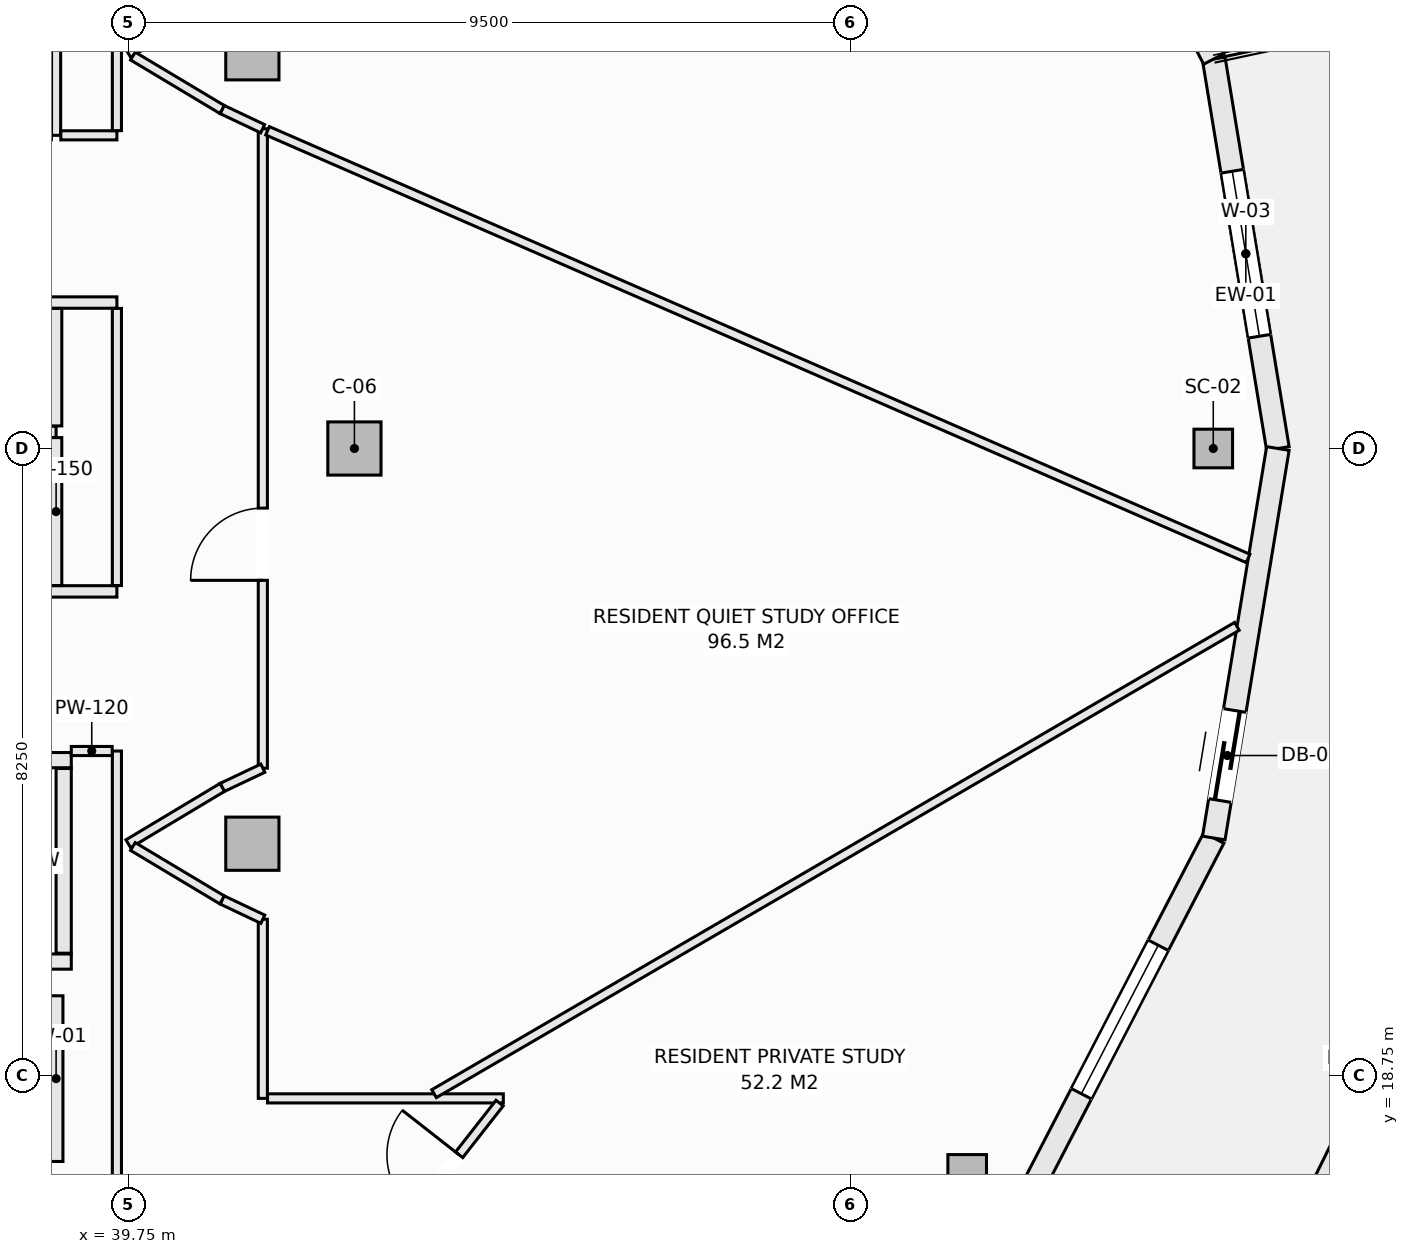
"""IFC4 building model, lengths in metres.
Left out: names, types, materials, properties, quantities, classifications, styles, units other than length and angle.
Written with IfcOpenShell. Run it as: python <this file> out.ifc"""

import sys

from ifc_helpers import new_model, si_unit, direction, frame, frame_2d, origin, origin_2d, place, context, subcontext, project, spatial, rectangle, hollow_rectangle, extrude, element, fill, save


model = new_model("IFC4")
c1 = context("Model", 3, precision=1e-05, world=origin(), true_north=direction((0.0, 1.0)))
c2 = subcontext(c1, "Body", "Model", "MODEL_VIEW")
j1 = project(units=[si_unit("LENGTHUNIT", "METRE"), si_unit("PLANEANGLEUNIT", "RADIAN")], contexts=[c1])
p1 = place(None, origin())
s1 = spatial("IfcSite", under=j1, at=p1, CompositionType="ELEMENT")
p2 = place(p1, origin())
s2 = spatial("IfcBuilding", under=s1, at=p2, CompositionType="ELEMENT")
p3 = place(p2, frame((0.0, 0.0, 229.4)))
s3 = spatial("IfcBuildingStorey", under=s2, at=p3, CompositionType="ELEMENT", Elevation=229.4)
for number, where, z_axis, x_axis in (
    (1, (54.025, 27.0, -0.27), (0.0, 0.0, 1.0), (1.0, 0.0, 0.0)),
    (2, (50.787, 17.456, -0.27), (0.0, 0.0, 1.0), (1.0, 0.0, 0.0)),
):
    element("IfcColumn", number, at=place(p3, frame(where, z_axis=z_axis, x_axis=x_axis)), inside=s3, PredefinedType="COLUMN", context=c2, shape_type="SweptSolid", body=[
        extrude(hollow_rectangle(XDim=0.508, YDim=0.508, WallThickness=0.019, at=origin_2d()), origin(), (0.0, 0.0, 1.0), 3.3),
    ])
for number, where, z_axis, x_axis in (
    (3, (42.725, 27.0, -0.27), (0.0, 0.0, 1.0), (1.0, 0.0, 0.0)),
    (4, (41.382, 32.199, -0.27), (0.0, 0.0, 1.0), (1.0, 0.0, 0.0)),
    (5, (41.382, 21.801, -0.27), (0.0, 0.0, 1.0), (1.0, 0.0, 0.0)),
):
    element("IfcColumn", number, at=place(p3, frame(where, z_axis=z_axis, x_axis=x_axis)), inside=s3, PredefinedType="COLUMN", context=c2, shape_type="SweptSolid", body=[
        extrude(rectangle(XDim=0.7, YDim=0.7, at=origin_2d()), origin(), (0.0, 0.0, 1.0), 3.3),
    ])
p4 = place(p3, frame((54.032, 32.125, 0.0), z_axis=(0.0, 0.0, 1.0), x_axis=(0.16237087798, -0.986729799886, 0.0)))
e6 = element("IfcWall", 6, at=p4, inside=s3, PredefinedType="SOLIDWALL", context=c2, shape_type="SweptSolid", body=[
    extrude(rectangle(XDim=5.193, YDim=0.3, at=frame_2d((2.597, 0.0))), origin(), (0.0, 0.0, 1.0), 2.605),
])
p5 = place(p4, frame((1.497, 0.0, 0.72)))
e7 = element("IfcOpeningElement", 7, at=p5, cuts=e6, PredefinedType="OPENING", context=c2, shape_type="SweptSolid", body=[
    extrude(rectangle(XDim=2.2, YDim=1.65, at=frame_2d((1.1, 0.825))), frame((0.0, 0.16, 0.0), z_axis=(0.0, -1.0, 0.0), x_axis=(1.0, 0.0, 0.0)), (0.0, 0.0, 1.0), 0.32),
])
p6 = place(p3, frame((51.559, 36.9, 0.0), z_axis=(0.0, 0.0, 1.0), x_axis=(0.459808219482, -0.888018243786, 0.0)))
e8 = element("IfcWall", 8, at=p6, inside=s3, PredefinedType="SOLIDWALL", context=c2, shape_type="SweptSolid", body=[
    extrude(rectangle(XDim=5.378, YDim=0.3, at=frame_2d((2.689, 0.0))), origin(), (0.0, 0.0, 1.0), 2.605),
])
p7 = place(p6, frame((1.589, 0.0, 0.72)))
e9 = element("IfcOpeningElement", 9, at=p7, cuts=e8, PredefinedType="OPENING", context=c2, shape_type="SweptSolid", body=[
    extrude(rectangle(XDim=2.2, YDim=1.65, at=frame_2d((1.1, 0.825))), frame((0.0, 0.16, 0.0), z_axis=(0.0, -1.0, 0.0), x_axis=(1.0, 0.0, 0.0)), (0.0, 0.0, 1.0), 0.32),
])
p8 = place(p3, frame((51.559, 17.1, 0.0), z_axis=(0.0, 0.0, 1.0), x_axis=(0.459808219482, 0.888018243786, 0.0)))
e10 = element("IfcWall", 10, at=p8, inside=s3, PredefinedType="SOLIDWALL", context=c2, shape_type="SweptSolid", body=[
    extrude(rectangle(XDim=5.378, YDim=0.3, at=frame_2d((2.689, 0.0))), origin(), (0.0, 0.0, 1.0), 2.605),
])
p9 = place(p8, frame((1.589, 0.0, 0.72)))
e11 = element("IfcOpeningElement", 11, at=p9, cuts=e10, PredefinedType="OPENING", context=c2, shape_type="SweptSolid", body=[
    extrude(rectangle(XDim=2.2, YDim=1.65, at=frame_2d((1.1, 0.825))), frame((0.0, 0.16, 0.0), z_axis=(0.0, -1.0, 0.0), x_axis=(1.0, 0.0, 0.0)), (0.0, 0.0, 1.0), 0.32),
])
p10 = place(p3, frame((54.032, 21.875, 0.0), z_axis=(0.0, 0.0, 1.0), x_axis=(0.16237087798, 0.986729799886, 0.0)))
e12 = element("IfcWall", 12, at=p10, inside=s3, PredefinedType="SOLIDWALL", context=c2, shape_type="SweptSolid", body=[
    extrude(rectangle(XDim=5.193, YDim=0.3, at=frame_2d((2.597, 0.0))), origin(), (0.0, 0.0, 1.0), 2.605),
])
p11 = place(p10, frame((0.5, 0.0, 0.0)))
e13 = element("IfcOpeningElement", 13, at=p11, cuts=e12, PredefinedType="OPENING", context=c2, shape_type="SweptSolid", body=[
    extrude(rectangle(XDim=1.2, YDim=2.2, at=frame_2d((0.6, 1.1))), frame((0.0, 0.16, 0.0), z_axis=(0.0, -1.0, 0.0), x_axis=(1.0, 0.0, 0.0)), (0.0, 0.0, 1.0), 0.32),
])
p12 = place(p3, frame((54.616, 15.653, 0.0), z_axis=(0.0, 0.0, 1.0), x_axis=(0.441640961804, 0.897191875162, 0.0)))
e14 = element("IfcWall", 14, at=p12, inside=s3, PredefinedType="PARAPET", context=c2, shape_type="SweptSolid", body=[
    extrude(rectangle(XDim=6.178, YDim=0.22, at=frame_2d((3.089, 0.0))), origin(), (0.0, 0.0, 1.0), 0.52),
])
p13 = place(p3, frame((36.75, 22.9, 0.0), z_axis=(0.0, 0.0, 1.0), x_axis=(1.0, 0.0, 0.0)))
e15 = element("IfcWall", 15, at=p13, inside=s3, PredefinedType="SOLIDWALL", context=c2, shape_type="SweptSolid", body=[
    extrude(rectangle(XDim=2.25, YDim=0.2, at=frame_2d((1.125, 0.0))), origin(), (0.0, 0.0, 1.0), 3.03),
])
p14 = place(p13, frame((0.575, 0.0, 0.0)))
e16 = element("IfcOpeningElement", 16, at=p14, cuts=e15, PredefinedType="OPENING", context=c2, shape_type="SweptSolid", body=[
    extrude(rectangle(XDim=1.1, YDim=2.2, at=frame_2d((0.55, 1.1))), frame((0.0, 0.11, 0.0), z_axis=(0.0, -1.0, 0.0), x_axis=(1.0, 0.0, 0.0)), (0.0, 0.0, 1.0), 0.22),
])
p15 = place(p3, frame((36.75, 20.25, 0.0), z_axis=(0.0, 0.0, 1.0), x_axis=(1.0, 0.0, 0.0)))
e17 = element("IfcWall", 17, at=p15, inside=s3, PredefinedType="SOLIDWALL", context=c2, shape_type="SweptSolid", body=[
    extrude(rectangle(XDim=2.25, YDim=0.2, at=frame_2d((1.125, 0.0))), origin(), (0.0, 0.0, 1.0), 3.03),
])
p16 = place(p3, frame((38.9, 20.36, 0.0), z_axis=(0.0, 0.0, 1.0), x_axis=(0.0, 1.0, 0.0)))
e18 = element("IfcWall", 18, at=p16, inside=s3, PredefinedType="SOLIDWALL", context=c2, shape_type="SweptSolid", body=[
    extrude(rectangle(XDim=2.43, YDim=0.2, at=frame_2d((1.215, 0.0))), origin(), (0.0, 0.0, 1.0), 3.03),
])
p17 = place(p3, frame((30.077, 28.92, 0.0), z_axis=(0.0, 0.0, 1.0), x_axis=(1.0, 0.0, 0.0)))
e19 = element("IfcWall", 19, at=p17, inside=s3, PredefinedType="PARTITIONING", context=c2, shape_type="SweptSolid", body=[
    extrude(rectangle(XDim=9.523, YDim=0.15, at=frame_2d((4.762, 0.0))), origin(), (0.0, 0.0, 1.0), 3.03),
])
p18 = place(p17, frame((1.342, 0.0, 0.0)))
e20 = element("IfcOpeningElement", 20, at=p18, cuts=e19, PredefinedType="OPENING", context=c2, shape_type="SweptSolid", body=[
    extrude(rectangle(XDim=0.95, YDim=2.1, at=frame_2d((0.475, 1.05))), frame((0.0, 0.085, 0.0), z_axis=(0.0, -1.0, 0.0), x_axis=(1.0, 0.0, 0.0)), (0.0, 0.0, 1.0), 0.17),
])
p19 = place(p17, frame((5.498, 0.0, 0.0)))
e21 = element("IfcOpeningElement", 21, at=p19, cuts=e19, PredefinedType="OPENING", context=c2, shape_type="SweptSolid", body=[
    extrude(rectangle(XDim=0.95, YDim=2.1, at=frame_2d((0.475, 1.05))), frame((0.0, 0.085, 0.0), z_axis=(0.0, -1.0, 0.0), x_axis=(1.0, 0.0, 0.0)), (0.0, 0.0, 1.0), 0.17),
])
p20 = place(p3, frame((33.377, 25.12, 0.0), z_axis=(0.0, 0.0, 1.0), x_axis=(1.0, 0.0, 0.0)))
e22 = element("IfcWall", 22, at=p20, inside=s3, PredefinedType="PARTITIONING", context=c2, shape_type="SweptSolid", body=[
    extrude(rectangle(XDim=6.223, YDim=0.15, at=frame_2d((3.112, 0.0))), origin(), (0.0, 0.0, 1.0), 3.03),
])
p21 = place(p20, frame((2.441, 0.0, 0.0)))
e23 = element("IfcOpeningElement", 23, at=p21, cuts=e22, PredefinedType="OPENING", context=c2, shape_type="SweptSolid", body=[
    extrude(rectangle(XDim=0.95, YDim=2.1, at=frame_2d((0.475, 1.05))), frame((0.0, 0.085, 0.0), z_axis=(0.0, -1.0, 0.0), x_axis=(1.0, 0.0, 0.0)), (0.0, 0.0, 1.0), 0.17),
])
p22 = place(p3, frame((33.377, 27.22, 0.0), z_axis=(0.0, 0.0, 1.0), x_axis=(1.0, 0.0, 0.0)))
e24 = element("IfcWall", 24, at=p22, inside=s3, PredefinedType="PARTITIONING", context=c2, shape_type="SweptSolid", body=[
    extrude(rectangle(XDim=5.423, YDim=0.15, at=frame_2d((2.711, 0.0))), origin(), (0.0, 0.0, 1.0), 3.03),
])
p23 = place(p3, frame((38.8, 17.62, 0.0), z_axis=(0.0, 0.0, 1.0), x_axis=(0.0, 1.0, 0.0)))
e25 = element("IfcWall", 25, at=p23, inside=s3, PredefinedType="SOLIDWALL", context=c2, shape_type="SweptSolid", body=[
    extrude(rectangle(XDim=2.18, YDim=0.18, at=frame_2d((1.09, 0.0))), origin(), (0.0, 0.0, 1.0), 3.03),
])
p24 = place(p3, frame((38.8, 25.197, 0.0), z_axis=(0.0, 0.0, 1.0), x_axis=(0.0, 1.0, 0.0)))
e26 = element("IfcWall", 26, at=p24, inside=s3, PredefinedType="PARTITIONING", context=c2, shape_type="SweptSolid", body=[
    extrude(rectangle(XDim=1.946, YDim=0.15, at=frame_2d((0.973, 0.0))), origin(), (0.0, 0.0, 1.0), 3.03),
])
p25 = place(p3, frame((38.8, 27.297, 0.0), z_axis=(0.0, 0.0, 1.0), x_axis=(0.0, 1.0, 0.0)))
e27 = element("IfcWall", 27, at=p25, inside=s3, PredefinedType="PARTITIONING", context=c2, shape_type="SweptSolid", body=[
    extrude(rectangle(XDim=1.546, YDim=0.15, at=frame_2d((0.773, 0.0))), origin(), (0.0, 0.0, 1.0), 3.03),
])
p26 = place(p3, frame((38.8, 31.12, 0.0), z_axis=(0.0, 0.0, 1.0), x_axis=(0.0, 1.0, 0.0)))
e28 = element("IfcWall", 28, at=p26, inside=s3, PredefinedType="PARTITIONING", context=c2, shape_type="SweptSolid", body=[
    extrude(rectangle(XDim=2.63, YDim=0.12, at=frame_2d((1.315, 0.0))), origin(), (0.0, 0.0, 1.0), 3.03),
])
p27 = place(p3, frame((38.862, 31.12, 0.0), z_axis=(0.0, 0.0, 1.0), x_axis=(1.0, 0.0, 0.0)))
e29 = element("IfcWall", 29, at=p27, inside=s3, PredefinedType="PARTITIONING", context=c2, shape_type="SweptSolid", body=[
    extrude(rectangle(XDim=0.738, YDim=0.12, at=frame_2d((0.369, 0.0))), origin(), (0.0, 0.0, 1.0), 3.03),
])
p28 = place(p3, frame((39.6, 16.5, 0.0), z_axis=(0.0, 0.0, 1.0), x_axis=(0.0, 1.0, 0.0)))
e30 = element("IfcWall", 30, at=p28, inside=s3, PredefinedType="PARTITIONING", context=c2, shape_type="SweptSolid", body=[
    extrude(rectangle(XDim=6.52, YDim=0.12, at=frame_2d((3.26, 0.0))), origin(), (0.0, 0.0, 1.0), 2.478),
])
p29 = place(p3, frame((39.6, 25.197, 0.0), z_axis=(0.0, 0.0, 1.0), x_axis=(0.0, 1.0, 0.0)))
e31 = element("IfcWall", 31, at=p29, inside=s3, PredefinedType="PARTITIONING", context=c2, shape_type="SweptSolid", body=[
    extrude(rectangle(XDim=3.646, YDim=0.12, at=frame_2d((1.823, 0.0))), origin(), (0.0, 0.0, 1.0), 3.03),
])
p30 = place(p3, frame((39.6, 31.182, 0.0), z_axis=(0.0, 0.0, 1.0), x_axis=(0.0, 1.0, 0.0)))
e32 = element("IfcWall", 32, at=p30, inside=s3, PredefinedType="PARTITIONING", context=c2, shape_type="SweptSolid", body=[
    extrude(rectangle(XDim=6.318, YDim=0.12, at=frame_2d((3.159, 0.0))), origin(), (0.0, 0.0, 1.0), 3.03),
])
p31 = place(p3, frame((41.52, 18.45, 0.0), z_axis=(0.0, 0.0, 1.0), x_axis=(0.0, 1.0, 0.0)))
e33 = element("IfcWall", 33, at=p31, inside=s3, PredefinedType="PARTITIONING", context=c2, shape_type="SweptSolid", body=[
    extrude(rectangle(XDim=2.357, YDim=0.12, at=frame_2d((1.178, 0.0))), origin(), (0.0, 0.0, 1.0), 3.03),
])
p32 = place(p3, frame((41.52, 22.794, 0.0), z_axis=(0.0, 0.0, 1.0), x_axis=(0.0, 1.0, 0.0)))
e34 = element("IfcWall", 34, at=p32, inside=s3, PredefinedType="PARTITIONING", context=c2, shape_type="SweptSolid", body=[
    extrude(rectangle(XDim=8.413, YDim=0.12, at=frame_2d((4.207, 0.0))), origin(), (0.0, 0.0, 1.0), 2.478),
])
p33 = place(p32, frame((2.471, 0.0, 0.0)))
e35 = element("IfcOpeningElement", 35, at=p33, cuts=e34, PredefinedType="OPENING", context=c2, shape_type="SweptSolid", body=[
    extrude(rectangle(XDim=0.95, YDim=2.1, at=frame_2d((0.475, 1.05))), frame((0.0, 0.07, 0.0), z_axis=(0.0, -1.0, 0.0), x_axis=(1.0, 0.0, 0.0)), (0.0, 0.0, 1.0), 0.14),
])
p34 = place(p3, frame((39.75, 32.199, 0.0), z_axis=(0.0, 0.0, 1.0), x_axis=(0.857702120906, 0.514146935996, 0.0)))
e36 = element("IfcWall", 36, at=p34, inside=s3, PredefinedType="PARTITIONING", context=c2, shape_type="SweptSolid", body=[
    extrude(rectangle(XDim=1.441, YDim=0.12, at=frame_2d((0.721, 0.0))), origin(), (0.0, 0.0, 1.0), 3.03),
])
p35 = place(p3, frame((39.81, 32.163, 0.0), z_axis=(0.0, 0.0, 1.0), x_axis=(0.858011245414, -0.513630901273, 0.0)))
e37 = element("IfcWall", 37, at=p35, inside=s3, PredefinedType="PARTITIONING", context=c2, shape_type="SweptSolid", body=[
    extrude(rectangle(XDim=1.37, YDim=0.12, at=frame_2d((0.685, 0.0))), origin(), (0.0, 0.0, 1.0), 3.03),
])
p36 = place(p3, frame((40.986, 31.459, 0.0), z_axis=(0.0, 0.0, 1.0), x_axis=(0.903687141457, -0.428193356283, 0.0)))
e38 = element("IfcWall", 38, at=p36, inside=s3, PredefinedType="PARTITIONING", context=c2, shape_type="SweptSolid", body=[
    extrude(rectangle(XDim=0.588, YDim=0.12, at=frame_2d((0.294, 0.0))), origin(), (0.0, 0.0, 1.0), 3.03),
])
p37 = place(p3, frame((40.986, 22.541, 0.0), z_axis=(0.0, 0.0, 1.0), x_axis=(0.903729424576, 0.428104107847, 0.0)))
e39 = element("IfcWall", 39, at=p37, inside=s3, PredefinedType="PARTITIONING", context=c2, shape_type="SweptSolid", body=[
    extrude(rectangle(XDim=0.591, YDim=0.12, at=frame_2d((0.295, 0.0))), origin(), (0.0, 0.0, 1.0), 3.03),
])
p38 = place(p3, frame((39.75, 21.8, 0.0), z_axis=(0.0, 0.0, 1.0), x_axis=(0.857702120906, 0.514146935996, 0.0)))
e40 = element("IfcWall", 40, at=p38, inside=s3, PredefinedType="PARTITIONING", context=c2, shape_type="SweptSolid", body=[
    extrude(rectangle(XDim=1.441, YDim=0.12, at=frame_2d((0.721, 0.0))), origin(), (0.0, 0.0, 1.0), 3.03),
])
p39 = place(p3, frame((39.81, 21.764, 0.0), z_axis=(0.0, 0.0, 1.0), x_axis=(0.858011245414, -0.513630901273, 0.0)))
e41 = element("IfcWall", 41, at=p39, inside=s3, PredefinedType="PARTITIONING", context=c2, shape_type="SweptSolid", body=[
    extrude(rectangle(XDim=1.37, YDim=0.12, at=frame_2d((0.685, 0.0))), origin(), (0.0, 0.0, 1.0), 3.03),
])
p40 = place(p3, frame((40.986, 21.06, 0.0), z_axis=(0.0, 0.0, 1.0), x_axis=(0.90356951601, -0.428441512621, 0.0)))
e42 = element("IfcWall", 42, at=p40, inside=s3, PredefinedType="PARTITIONING", context=c2, shape_type="SweptSolid", body=[
    extrude(rectangle(XDim=0.591, YDim=0.12, at=frame_2d((0.295, 0.0))), origin(), (0.0, 0.0, 1.0), 3.03),
])
p41 = place(p3, frame((41.582, 18.45, 0.0), z_axis=(0.0, 0.0, 1.0), x_axis=(1.0, 0.0, 0.0)))
e43 = element("IfcWall", 43, at=p41, inside=s3, PredefinedType="PARTITIONING", context=c2, shape_type="SweptSolid", body=[
    extrude(rectangle(XDim=3.102, YDim=0.12, at=frame_2d((1.551, 0.0))), origin(), (0.0, 0.0, 1.0), 3.03),
])
p42 = place(p3, frame((43.157, 16.5, 0.0), z_axis=(0.0, 0.0, 1.0), x_axis=(0.616566276607, 0.787303008092, 0.0)))
e44 = element("IfcWall", 44, at=p42, inside=s3, PredefinedType="PARTITIONING", context=c2, shape_type="SweptSolid", body=[
    extrude(rectangle(XDim=2.398, YDim=0.12, at=frame_2d((1.199, 0.0))), origin(), (0.0, 0.0, 1.0), 3.03),
])
p43 = place(p42, frame((0.584, 0.0, 0.0)))
e45 = element("IfcOpeningElement", 45, at=p43, cuts=e44, PredefinedType="OPENING", context=c2, shape_type="SweptSolid", body=[
    extrude(rectangle(XDim=0.95, YDim=2.1, at=frame_2d((0.475, 1.05))), frame((0.0, 0.07, 0.0), z_axis=(0.0, -1.0, 0.0), x_axis=(1.0, 0.0, 0.0)), (0.0, 0.0, 1.0), 0.14),
])
p44 = place(p3, frame((39.0, 23.02, 0.0), z_axis=(0.0, 0.0, 1.0), x_axis=(1.0, 0.0, 0.0)))
e46 = element("IfcWall", 46, at=p44, inside=s3, PredefinedType="PARTITIONING", context=c2, shape_type="SweptSolid", body=[
    extrude(rectangle(XDim=0.538, YDim=0.12, at=frame_2d((0.269, 0.0))), origin(), (0.0, 0.0, 1.0), 3.03),
])
p45 = place(p3, frame((43.773, 18.512, 0.0), z_axis=(0.0, 0.0, 1.0), x_axis=(0.864261022419, 0.503043621495, 0.0)))
e47 = element("IfcWall", 47, at=p45, inside=s3, PredefinedType="PARTITIONING", context=c2, shape_type="SweptSolid", body=[
    extrude(rectangle(XDim=12.222, YDim=0.12, at=frame_2d((6.111, 0.0))), origin(), (0.0, 0.0, 1.0), 3.03),
])
p46 = place(p3, frame((41.582, 31.18, 0.0), z_axis=(0.0, 0.0, 1.0), x_axis=(0.916624100851, -0.399750244202, 0.0)))
e48 = element("IfcWall", 48, at=p46, inside=s3, PredefinedType="PARTITIONING", context=c2, shape_type="SweptSolid", body=[
    extrude(rectangle(XDim=14.074, YDim=0.12, at=frame_2d((7.037, 0.0))), origin(), (0.0, 0.0, 1.0), 2.478),
])
p47 = place(p5, origin())
e49 = element("IfcWindow", 49, at=p47, inside=s3, PartitioningType="SINGLE_PANEL", PredefinedType="WINDOW", context=c2, shape_type="SweptSolid", body=[
    extrude(rectangle(XDim=2.2, YDim=1.65, at=frame_2d((1.1, 0.825))), frame((0.0, 0.03, 0.0), z_axis=(0.0, -1.0, 0.0), x_axis=(1.0, 0.0, 0.0)), (0.0, 0.0, 1.0), 0.06),
])
fill(e7, e49)
p48 = place(p9, origin())
e50 = element("IfcWindow", 50, at=p48, inside=s3, PartitioningType="SINGLE_PANEL", PredefinedType="WINDOW", context=c2, shape_type="SweptSolid", body=[
    extrude(rectangle(XDim=2.2, YDim=1.65, at=frame_2d((1.1, 0.825))), frame((0.0, 0.03, 0.0), z_axis=(0.0, -1.0, 0.0), x_axis=(1.0, 0.0, 0.0)), (0.0, 0.0, 1.0), 0.06),
])
fill(e11, e50)
p49 = place(p11, frame((1.2, 0.0, 0.0), z_axis=(0.0, 0.0, 1.0), x_axis=(-1.0, 0.0, 0.0)))
e51 = element("IfcDoor", 51, at=p49, inside=s3, OperationType="SLIDING_TO_LEFT", PredefinedType="DOOR", context=c2, shape_type="SweptSolid", body=[
    extrude(rectangle(XDim=1.2, YDim=2.2, at=frame_2d((0.6, 1.1))), frame((0.0, 0.025, 0.0), z_axis=(0.0, -1.0, 0.0), x_axis=(1.0, 0.0, 0.0)), (0.0, 0.0, 1.0), 0.05),
])
fill(e13, e51)
p50 = place(p43, origin())
e52 = element("IfcDoor", 52, at=p50, inside=s3, OperationType="SINGLE_SWING_RIGHT", PredefinedType="DOOR", context=c2, shape_type="SweptSolid", body=[
    extrude(rectangle(XDim=0.95, YDim=2.1, at=frame_2d((0.475, 1.05))), frame((0.0, 0.025, 0.0), z_axis=(0.0, -1.0, 0.0), x_axis=(1.0, 0.0, 0.0)), (0.0, 0.0, 1.0), 0.05),
])
fill(e45, e52)
p51 = place(p33, origin())
e53 = element("IfcDoor", 53, at=p51, inside=s3, OperationType="SINGLE_SWING_LEFT", PredefinedType="DOOR", context=c2, shape_type="SweptSolid", body=[
    extrude(rectangle(XDim=0.95, YDim=2.1, at=frame_2d((0.475, 1.05))), frame((0.0, 0.025, 0.0), z_axis=(0.0, -1.0, 0.0), x_axis=(1.0, 0.0, 0.0)), (0.0, 0.0, 1.0), 0.05),
])
fill(e35, e53)
save(model, sys.argv[1])
